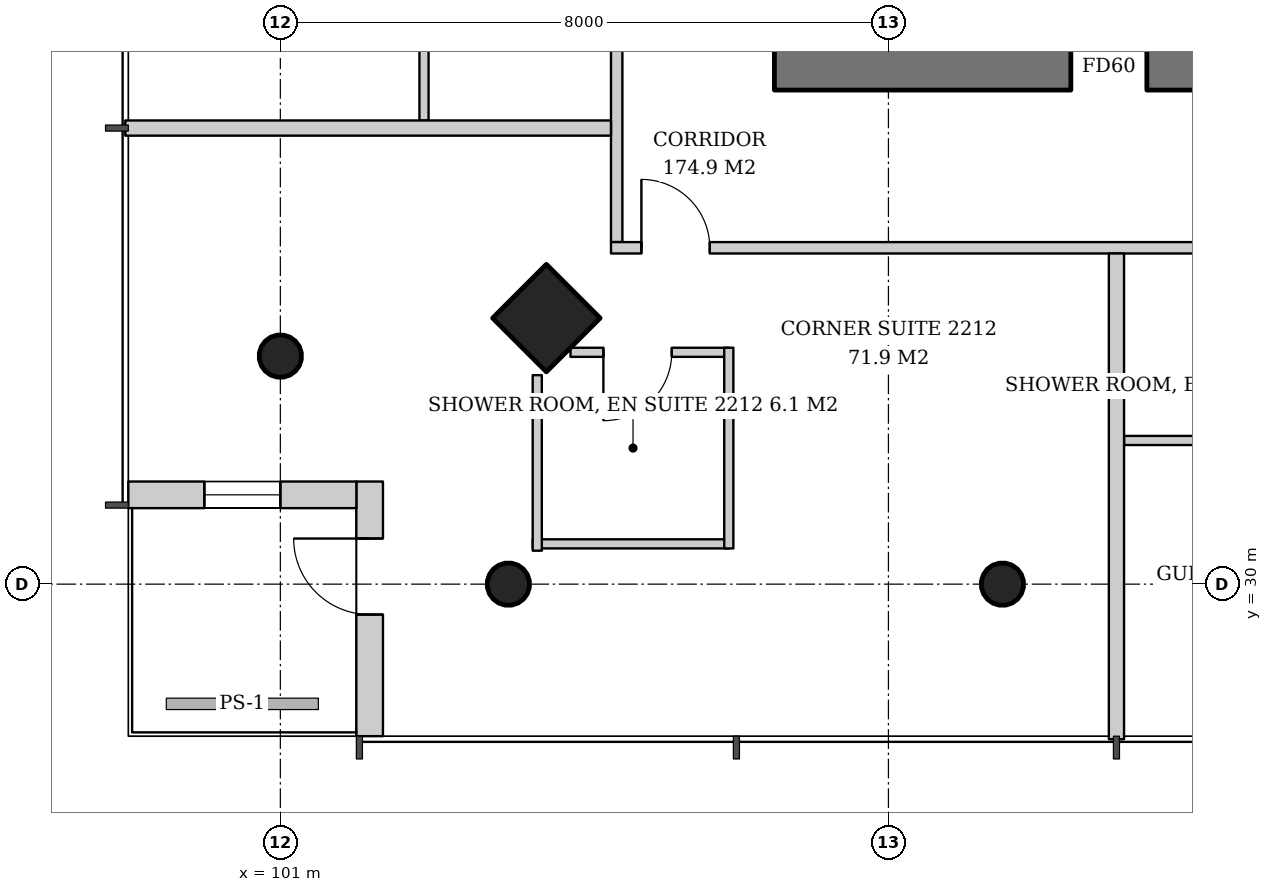
"""IFC4 building model, lengths in metres.
Left out: names, types, materials, properties, quantities, classifications, styles, units other than length and angle.
Written with IfcOpenShell. Run it as: python <this file> out.ifc"""

import sys

from ifc_helpers import new_model, si_unit, direction, frame, frame_2d, origin, origin_2d, place, context, subcontext, project, spatial, rectangle, hollow_circle, extrude, element, fill, save


model = new_model("IFC4")
c1 = context("Model", 3, precision=1e-05, world=origin(), true_north=direction((0.0, 1.0)))
c2 = subcontext(c1, "Body", "Model", "MODEL_VIEW")
j1 = project(units=[si_unit("LENGTHUNIT", "METRE"), si_unit("PLANEANGLEUNIT", "RADIAN")], contexts=[c1])
p1 = place(None, origin())
s1 = spatial("IfcSite", under=j1, at=p1, CompositionType="ELEMENT")
p2 = place(p1, origin())
s2 = spatial("IfcBuilding", under=s1, at=p2, CompositionType="ELEMENT")
p3 = place(p2, frame((0.0, 0.0, 89.4)))
s3 = spatial("IfcBuildingStorey", under=s2, at=p3, CompositionType="ELEMENT", Elevation=89.4)
p4 = place(p3, frame((104.448, 33.448, 0.0), z_axis=(0.043029647111, 0.043029647111, 0.998146732169), x_axis=(-0.707106781187, 0.707106781187, 0.0)))
e1 = element("IfcColumn", 1, at=p4, inside=s3, PredefinedType="COLUMN", context=c2, shape_type="SweptSolid", body=[
    extrude(rectangle(XDim=1.0, YDim=1.0, at=origin_2d()), origin(), (0.0, 0.0, 1.0), 3.807),
])
for number, where, z_axis, x_axis in (
    (2, (100.948, 32.948, 0.0), (0.043, 0.043, 0.998), (-0.707, 0.707, 0.0)),
    (3, (103.948, 29.948, 0.0), (0.043, 0.043, 0.998), (-0.707, 0.707, 0.0)),
):
    element("IfcColumn", number, at=place(p3, frame(where, z_axis=z_axis, x_axis=x_axis)), inside=s3, PredefinedType="COLUMN", context=c2, shape_type="SweptSolid", body=[
        extrude(hollow_circle(Radius=0.28, WallThickness=0.02, at=origin_2d()), origin(), (0.0, 0.0, 1.0), 3.807),
    ])
p5 = place(p3, frame((110.474, 29.948, 0.0), z_axis=(0.021561848751, 0.043059525333, 0.998839808957), x_axis=(-0.894160516368, 0.44774654769, 0.0)))
e4 = element("IfcColumn", 4, at=p5, inside=s3, PredefinedType="COLUMN", context=c2, shape_type="SweptSolid", body=[
    extrude(hollow_circle(Radius=0.28, WallThickness=0.02, at=origin_2d()), origin(), (0.0, 0.0, 1.0), 3.804),
])
p6 = place(p3, frame((107.5, 36.8, 0.0), z_axis=(0.0, 0.0, 1.0), x_axis=(1.0, 0.0, 0.0)))
e5 = element("IfcWall", 5, at=p6, inside=s3, PredefinedType="SHEAR", context=c2, shape_type="SweptSolid", body=[
    extrude(rectangle(XDim=19.0, YDim=0.6, at=frame_2d((9.5, 0.0))), origin(), (0.0, 0.0, 1.0), 3.8),
])
p7 = place(p6, frame((3.9, 0.0, 0.0)))
e6 = element("IfcOpeningElement", 6, at=p7, cuts=e5, PredefinedType="OPENING", context=c2, shape_type="SweptSolid", body=[
    extrude(rectangle(XDim=1.0, YDim=2.1, at=frame_2d((0.5, 1.05))), frame((0.0, 0.31, 0.0), z_axis=(0.0, -1.0, 0.0), x_axis=(1.0, 0.0, 0.0)), (0.0, 0.0, 1.0), 0.62),
])
p8 = place(p6, frame((14.472, 0.0, 0.0)))
e7 = element("IfcOpeningElement", 7, at=p8, cuts=e5, PredefinedType="OPENING", context=c2, shape_type="SweptSolid", body=[
    extrude(rectangle(XDim=1.0, YDim=2.1, at=frame_2d((0.5, 1.05))), frame((0.0, 0.31, 0.0), z_axis=(0.0, -1.0, 0.0), x_axis=(1.0, 0.0, 0.0)), (0.0, 0.0, 1.0), 0.62),
])
p9 = place(p6, frame((16.365, 0.0, 0.0)))
e8 = element("IfcOpeningElement", 8, at=p9, cuts=e5, PredefinedType="OPENING", context=c2, shape_type="SweptSolid", body=[
    extrude(rectangle(XDim=1.0, YDim=2.1, at=frame_2d((0.5, 1.05))), frame((0.0, 0.31, 0.0), z_axis=(0.0, -1.0, 0.0), x_axis=(1.0, 0.0, 0.0)), (0.0, 0.0, 1.0), 0.62),
])
p10 = place(p3, frame((102.175, 28.0, 0.0), z_axis=(0.0, 0.0, 1.0), x_axis=(0.0, 1.0, 0.0)))
e9 = element("IfcWall", 9, at=p10, inside=s3, PredefinedType="SOLIDWALL", context=c2, shape_type="SweptSolid", body=[
    extrude(rectangle(XDim=3.35, YDim=0.35, at=frame_2d((1.675, 0.0))), origin(), (0.0, 0.0, 1.0), 3.6),
])
p11 = place(p10, frame((1.6, 0.0, 0.0)))
e10 = element("IfcOpeningElement", 10, at=p11, cuts=e9, PredefinedType="OPENING", context=c2, shape_type="SweptSolid", body=[
    extrude(rectangle(XDim=1.0, YDim=2.4, at=frame_2d((0.5, 1.2))), frame((0.0, 0.185, 0.0), z_axis=(0.0, -1.0, 0.0), x_axis=(1.0, 0.0, 0.0)), (0.0, 0.0, 1.0), 0.37),
])
p12 = place(p3, frame((102.0, 31.175, 0.0), z_axis=(0.0, 0.0, 1.0), x_axis=(-1.0, 0.0, 0.0)))
e11 = element("IfcWall", 11, at=p12, inside=s3, PredefinedType="SOLIDWALL", context=c2, shape_type="SweptSolid", body=[
    extrude(rectangle(XDim=3.0, YDim=0.35, at=frame_2d((1.5, 0.0))), origin(), (0.0, 0.0, 1.0), 3.6),
])
p13 = place(p12, frame((1.0, 0.0, 0.9)))
e12 = element("IfcOpeningElement", 12, at=p13, cuts=e11, PredefinedType="OPENING", context=c2, shape_type="SweptSolid", body=[
    extrude(rectangle(XDim=1.0, YDim=2.4, at=frame_2d((0.5, 1.2))), frame((0.0, 0.185, 0.0), z_axis=(0.0, -1.0, 0.0), x_axis=(1.0, 0.0, 0.0)), (0.0, 0.0, 1.0), 0.37),
])
p14 = place(p3, frame((102.89, 38.52, 0.0), z_axis=(0.0, 0.0, 1.0), x_axis=(0.0, -1.0, 0.0)))
e13 = element("IfcWall", 13, at=p14, inside=s3, PredefinedType="PARTITIONING", context=c2, shape_type="SweptSolid", body=[
    extrude(rectangle(XDim=2.42, YDim=0.12, at=frame_2d((1.21, 0.0))), origin(), (0.0, 0.0, 1.0), 3.0),
])
p15 = place(p3, frame((105.425, 57.65, 0.0), z_axis=(0.0, 0.0, 1.0), x_axis=(0.0, -1.0, 0.0)))
e14 = element("IfcWall", 14, at=p15, inside=s3, PredefinedType="PARTITIONING", context=c2, shape_type="SweptSolid", body=[
    extrude(rectangle(XDim=23.15, YDim=0.15, at=frame_2d((11.575, 0.0))), origin(), (0.0, 0.0, 1.0), 2.9),
])
p16 = place(p15, frame((0.4, 0.0, 0.0)))
e15 = element("IfcOpeningElement", 15, at=p16, cuts=e14, PredefinedType="OPENING", context=c2, shape_type="SweptSolid", body=[
    extrude(rectangle(XDim=0.9, YDim=2.1, at=frame_2d((0.45, 1.05))), frame((0.0, 0.085, 0.0), z_axis=(0.0, -1.0, 0.0), x_axis=(1.0, 0.0, 0.0)), (0.0, 0.0, 1.0), 0.17),
])
p17 = place(p15, frame((4.35, 0.0, 0.0)))
e16 = element("IfcOpeningElement", 16, at=p17, cuts=e14, PredefinedType="OPENING", context=c2, shape_type="SweptSolid", body=[
    extrude(rectangle(XDim=1.0, YDim=2.1, at=frame_2d((0.5, 1.05))), frame((0.0, 0.085, 0.0), z_axis=(0.0, -1.0, 0.0), x_axis=(1.0, 0.0, 0.0)), (0.0, 0.0, 1.0), 0.17),
])
p18 = place(p15, frame((8.0, 0.0, 0.0)))
e17 = element("IfcOpeningElement", 17, at=p18, cuts=e14, PredefinedType="OPENING", context=c2, shape_type="SweptSolid", body=[
    extrude(rectangle(XDim=0.9, YDim=2.1, at=frame_2d((0.45, 1.05))), frame((0.0, 0.085, 0.0), z_axis=(0.0, -1.0, 0.0), x_axis=(1.0, 0.0, 0.0)), (0.0, 0.0, 1.0), 0.17),
])
p19 = place(p15, frame((14.4, 0.0, 0.0)))
e18 = element("IfcOpeningElement", 18, at=p19, cuts=e14, PredefinedType="OPENING", context=c2, shape_type="SweptSolid", body=[
    extrude(rectangle(XDim=0.9, YDim=2.1, at=frame_2d((0.45, 1.05))), frame((0.0, 0.085, 0.0), z_axis=(0.0, -1.0, 0.0), x_axis=(1.0, 0.0, 0.0)), (0.0, 0.0, 1.0), 0.17),
])
p20 = place(p15, frame((18.0, 0.0, 0.0)))
e19 = element("IfcOpeningElement", 19, at=p20, cuts=e14, PredefinedType="OPENING", context=c2, shape_type="SweptSolid", body=[
    extrude(rectangle(XDim=0.9, YDim=2.1, at=frame_2d((0.45, 1.05))), frame((0.0, 0.085, 0.0), z_axis=(0.0, -1.0, 0.0), x_axis=(1.0, 0.0, 0.0)), (0.0, 0.0, 1.0), 0.17),
])
p21 = place(p3, frame((105.35, 36.0, 0.0), z_axis=(0.0, 0.0, 1.0), x_axis=(-1.0, 0.0, 0.0)))
e20 = element("IfcWall", 20, at=p21, inside=s3, PredefinedType="PARTITIONING", context=c2, shape_type="SweptSolid", body=[
    extrude(rectangle(XDim=6.39, YDim=0.2, at=frame_2d((3.195, 0.0))), origin(), (0.0, 0.0, 1.0), 3.2),
])
p22 = place(p3, frame((106.9, 33.05, 0.0), z_axis=(0.0, 0.0, 1.0), x_axis=(-1.0, 0.0, 0.0)))
e21 = element("IfcWall", 21, at=p22, inside=s3, PredefinedType="PARTITIONING", context=c2, shape_type="SweptSolid", body=[
    extrude(rectangle(XDim=2.083, YDim=0.12, at=frame_2d((1.042, 0.0))), origin(), (0.0, 0.0, 1.0), 3.6),
])
p23 = place(p22, frame((0.75, 0.0, 0.0)))
e22 = element("IfcOpeningElement", 22, at=p23, cuts=e21, PredefinedType="OPENING", context=c2, shape_type="SweptSolid", body=[
    extrude(rectangle(XDim=0.9, YDim=2.1, at=frame_2d((0.45, 1.05))), frame((0.0, 0.07, 0.0), z_axis=(0.0, -1.0, 0.0), x_axis=(1.0, 0.0, 0.0)), (0.0, 0.0, 1.0), 0.14),
])
p24 = place(p3, frame((106.9, 30.53, 0.0), z_axis=(0.0, 0.0, 1.0), x_axis=(-1.0, 0.0, 0.0)))
e23 = element("IfcWall", 23, at=p24, inside=s3, PredefinedType="PARTITIONING", context=c2, shape_type="SweptSolid", body=[
    extrude(rectangle(XDim=2.58, YDim=0.12, at=frame_2d((1.29, 0.0))), origin(), (0.0, 0.0, 1.0), 3.2),
])
p25 = place(p3, frame((104.38, 32.75, 0.0), z_axis=(0.0, 0.0, 1.0), x_axis=(0.0, -1.0, 0.0)))
e24 = element("IfcWall", 24, at=p25, inside=s3, PredefinedType="PARTITIONING", context=c2, shape_type="SweptSolid", body=[
    extrude(rectangle(XDim=2.31, YDim=0.12, at=frame_2d((1.155, 0.0))), origin(), (0.0, 0.0, 1.0), 3.2),
])
p26 = place(p3, frame((106.9, 33.11, 0.0), z_axis=(0.0, 0.0, 1.0), x_axis=(0.0, -1.0, 0.0)))
e25 = element("IfcWall", 25, at=p26, inside=s3, PredefinedType="PARTITIONING", context=c2, shape_type="SweptSolid", body=[
    extrude(rectangle(XDim=2.64, YDim=0.12, at=frame_2d((1.32, 0.0))), origin(), (0.0, 0.0, 1.0), 3.6),
])
p27 = place(p3, frame((112.1, 31.89, 0.0), z_axis=(0.0, 0.0, 1.0), x_axis=(1.0, 0.0, 0.0)))
e26 = element("IfcWall", 26, at=p27, inside=s3, PredefinedType="PARTITIONING", context=c2, shape_type="SweptSolid", body=[
    extrude(rectangle(XDim=2.42, YDim=0.12, at=frame_2d((1.21, 0.0))), origin(), (0.0, 0.0, 1.0), 3.6),
])
p28 = place(p3, frame((105.35, 34.425, 0.0), z_axis=(0.0, 0.0, 1.0), x_axis=(1.0, 0.0, 0.0)))
e27 = element("IfcWall", 27, at=p28, inside=s3, PredefinedType="PARTITIONING", context=c2, shape_type="SweptSolid", body=[
    extrude(rectangle(XDim=23.15, YDim=0.15, at=frame_2d((11.575, 0.0))), origin(), (0.0, 0.0, 1.0), 2.9),
])
p29 = place(p28, frame((0.4, 0.0, 0.0)))
e28 = element("IfcOpeningElement", 28, at=p29, cuts=e27, PredefinedType="OPENING", context=c2, shape_type="SweptSolid", body=[
    extrude(rectangle(XDim=0.9, YDim=2.1, at=frame_2d((0.45, 1.05))), frame((0.0, 0.085, 0.0), z_axis=(0.0, -1.0, 0.0), x_axis=(1.0, 0.0, 0.0)), (0.0, 0.0, 1.0), 0.17),
])
p30 = place(p28, frame((9.4, 0.0, 0.0)))
e29 = element("IfcOpeningElement", 29, at=p30, cuts=e27, PredefinedType="OPENING", context=c2, shape_type="SweptSolid", body=[
    extrude(rectangle(XDim=0.9, YDim=2.1, at=frame_2d((0.45, 1.05))), frame((0.0, 0.085, 0.0), z_axis=(0.0, -1.0, 0.0), x_axis=(1.0, 0.0, 0.0)), (0.0, 0.0, 1.0), 0.17),
])
p31 = place(p28, frame((13.0, 0.0, 0.0)))
e30 = element("IfcOpeningElement", 30, at=p31, cuts=e27, PredefinedType="OPENING", context=c2, shape_type="SweptSolid", body=[
    extrude(rectangle(XDim=0.9, YDim=2.1, at=frame_2d((0.45, 1.05))), frame((0.0, 0.085, 0.0), z_axis=(0.0, -1.0, 0.0), x_axis=(1.0, 0.0, 0.0)), (0.0, 0.0, 1.0), 0.17),
])
p32 = place(p28, frame((19.4, 0.0, 0.0)))
e31 = element("IfcOpeningElement", 31, at=p32, cuts=e27, PredefinedType="OPENING", context=c2, shape_type="SweptSolid", body=[
    extrude(rectangle(XDim=0.9, YDim=2.1, at=frame_2d((0.45, 1.05))), frame((0.0, 0.085, 0.0), z_axis=(0.0, -1.0, 0.0), x_axis=(1.0, 0.0, 0.0)), (0.0, 0.0, 1.0), 0.17),
])
p33 = place(p3, frame((112.0, 34.35, 0.0), z_axis=(0.0, 0.0, 1.0), x_axis=(0.0, -1.0, 0.0)))
e32 = element("IfcWall", 32, at=p33, inside=s3, PredefinedType="PARTITIONING", context=c2, shape_type="SweptSolid", body=[
    extrude(rectangle(XDim=6.39, YDim=0.2, at=frame_2d((3.195, 0.0))), origin(), (0.0, 0.0, 1.0), 3.0),
])
p34 = place(p11, origin())
e33 = element("IfcDoor", 33, at=p34, inside=s3, OperationType="SINGLE_SWING_RIGHT", PredefinedType="DOOR", context=c2, shape_type="SweptSolid", body=[
    extrude(rectangle(XDim=1.0, YDim=2.4, at=frame_2d((0.5, 1.2))), frame((0.0, 0.025, 0.0), z_axis=(0.0, -1.0, 0.0), x_axis=(1.0, 0.0, 0.0)), (0.0, 0.0, 1.0), 0.05),
])
fill(e10, e33)
p35 = place(p13, origin())
e34 = element("IfcWindow", 34, at=p35, inside=s3, PartitioningType="SINGLE_PANEL", PredefinedType="WINDOW", context=c2, shape_type="SweptSolid", body=[
    extrude(rectangle(XDim=1.0, YDim=2.4, at=frame_2d((0.5, 1.2))), frame((0.0, 0.03, 0.0), z_axis=(0.0, -1.0, 0.0), x_axis=(1.0, 0.0, 0.0)), (0.0, 0.0, 1.0), 0.06),
])
fill(e12, e34)
p36 = place(p7, origin())
e35 = element("IfcDoor", 35, at=p36, inside=s3, OperationType="SINGLE_SWING_LEFT", PredefinedType="DOOR", context=c2, shape_type="SweptSolid", body=[
    extrude(rectangle(XDim=1.0, YDim=2.1, at=frame_2d((0.5, 1.05))), frame((0.0, 0.025, 0.0), z_axis=(0.0, -1.0, 0.0), x_axis=(1.0, 0.0, 0.0)), (0.0, 0.0, 1.0), 0.05),
])
fill(e6, e35)
p37 = place(p23, origin())
e36 = element("IfcDoor", 36, at=p37, inside=s3, OperationType="SINGLE_SWING_RIGHT", PredefinedType="DOOR", context=c2, shape_type="SweptSolid", body=[
    extrude(rectangle(XDim=0.9, YDim=2.1, at=frame_2d((0.45, 1.05))), frame((0.0, 0.025, 0.0), z_axis=(0.0, -1.0, 0.0), x_axis=(1.0, 0.0, 0.0)), (0.0, 0.0, 1.0), 0.05),
])
fill(e22, e36)
p38 = place(p29, origin())
e37 = element("IfcDoor", 37, at=p38, inside=s3, OperationType="SINGLE_SWING_LEFT", PredefinedType="DOOR", context=c2, shape_type="SweptSolid", body=[
    extrude(rectangle(XDim=0.9, YDim=2.1, at=frame_2d((0.45, 1.05))), frame((0.0, 0.025, 0.0), z_axis=(0.0, -1.0, 0.0), x_axis=(1.0, 0.0, 0.0)), (0.0, 0.0, 1.0), 0.05),
])
fill(e28, e37)
save(model, sys.argv[1])
